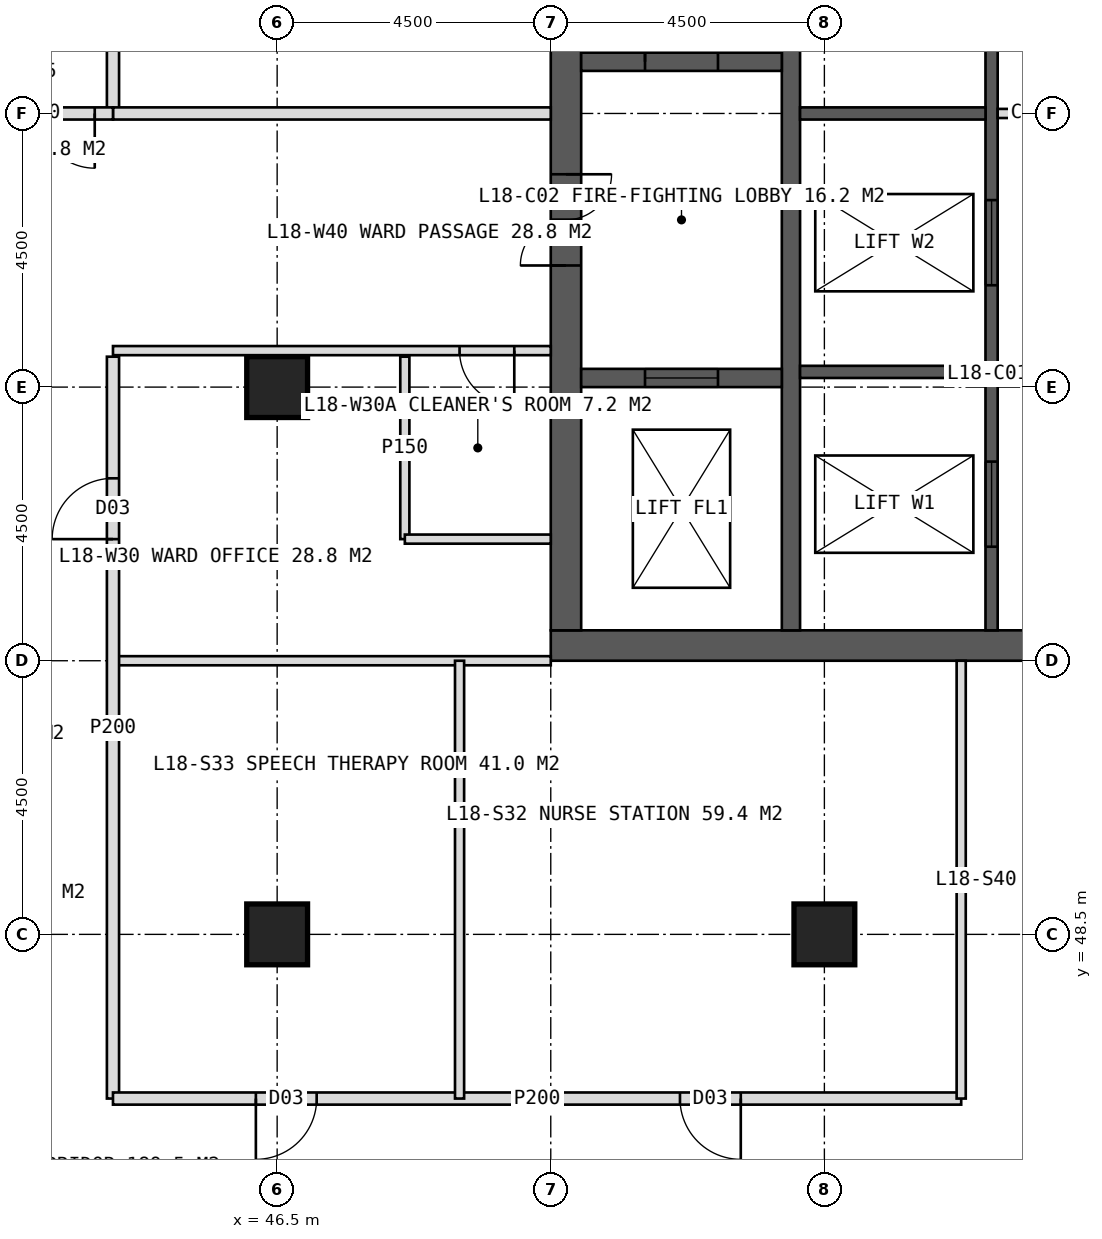
"""IFC4 building model, lengths in metres.
Left out: names, types, materials, properties, quantities, classifications, styles, units other than length and angle.
Written with IfcOpenShell. Run it as: python <this file> out.ifc"""

import sys

from ifc_helpers import new_model, si_unit, direction, frame, frame_2d, origin, origin_2d, place, context, subcontext, project, spatial, rectangle, hollow_rectangle, extrude, element, fill, save


model = new_model("IFC4")
c1 = context("Model", 3, precision=1e-05, world=origin(), true_north=direction((0.0, 1.0)))
c2 = subcontext(c1, "Body", "Model", "MODEL_VIEW")
j1 = project(units=[si_unit("LENGTHUNIT", "METRE"), si_unit("PLANEANGLEUNIT", "RADIAN")], contexts=[c1])
p1 = place(None, origin())
s1 = spatial("IfcSite", under=j1, at=p1, CompositionType="ELEMENT")
p2 = place(p1, origin())
s2 = spatial("IfcBuilding", under=s1, at=p2, CompositionType="ELEMENT")
p3 = place(p2, frame((0.0, 0.0, 79.0)))
s3 = spatial("IfcBuildingStorey", under=s2, at=p3, CompositionType="ELEMENT", Elevation=79.0)
p4 = place(p3, frame((51.0, 53.25, 0.0), z_axis=(0.0, 0.0, 1.0), x_axis=(1.0, 0.0, 0.0)))
e1 = element("IfcWall", 1, at=p4, inside=s3, PredefinedType="SHEAR", context=c2, shape_type="SweptSolid", body=[
    extrude(rectangle(XDim=18.0, YDim=0.5, at=frame_2d((9.0, 0.0))), origin(), (0.0, 0.0, 1.0), 4.0),
])
p5 = place(p4, frame((8.1, 0.0, 0.0)))
e2 = element("IfcOpeningElement", 2, at=p5, cuts=e1, PredefinedType="OPENING", context=c2, shape_type="SweptSolid", body=[
    extrude(rectangle(XDim=1.8, YDim=2.2, at=frame_2d((0.9, 1.1))), frame((0.0, 0.26, 0.0), z_axis=(0.0, -1.0, 0.0), x_axis=(1.0, 0.0, 0.0)), (0.0, 0.0, 1.0), 0.52),
])
p6 = place(p3, frame((51.25, 53.5, 0.0), z_axis=(0.0, 0.0, 1.0), x_axis=(0.0, 1.0, 0.0)))
e3 = element("IfcWall", 3, at=p6, inside=s3, PredefinedType="SHEAR", context=c2, shape_type="SweptSolid", body=[
    extrude(rectangle(XDim=17.0, YDim=0.5, at=frame_2d((8.5, 0.0))), origin(), (0.0, 0.0, 1.0), 4.0),
])
p7 = place(p6, frame((6.0, 0.0, 0.0)))
e4 = element("IfcOpeningElement", 4, at=p7, cuts=e3, PredefinedType="OPENING", context=c2, shape_type="SweptSolid", body=[
    extrude(rectangle(XDim=1.5, YDim=2.2, at=frame_2d((0.75, 1.1))), frame((0.0, 0.26, 0.0), z_axis=(0.0, -1.0, 0.0), x_axis=(1.0, 0.0, 0.0)), (0.0, 0.0, 1.0), 0.52),
])
p8 = place(p3, frame((54.95, 53.5, 0.0), z_axis=(0.0, 0.0, 1.0), x_axis=(0.0, 1.0, 0.0)))
e5 = element("IfcWall", 5, at=p8, inside=s3, PredefinedType="SHEAR", context=c2, shape_type="SweptSolid", body=[
    extrude(rectangle(XDim=17.0, YDim=0.3, at=frame_2d((8.5, 0.0))), origin(), (0.0, 0.0, 1.0), 4.0),
])
p9 = place(p3, frame((58.25, 53.5, 0.0), z_axis=(0.0, 0.0, 1.0), x_axis=(0.0, 1.0, 0.0)))
e6 = element("IfcWall", 6, at=p9, inside=s3, PredefinedType="SHEAR", context=c2, shape_type="SweptSolid", body=[
    extrude(rectangle(XDim=17.0, YDim=0.2, at=frame_2d((8.5, 0.0))), origin(), (0.0, 0.0, 1.0), 4.0),
])
p10 = place(p9, frame((1.375, 0.0, 0.0)))
e7 = element("IfcOpeningElement", 7, at=p10, cuts=e6, PredefinedType="OPENING", context=c2, shape_type="SweptSolid", body=[
    extrude(rectangle(XDim=1.4, YDim=2.2, at=frame_2d((0.7, 1.1))), frame((0.0, 0.11, 0.0), z_axis=(0.0, -1.0, 0.0), x_axis=(1.0, 0.0, 0.0)), (0.0, 0.0, 1.0), 0.22),
])
p11 = place(p9, frame((5.675, 0.0, 0.0)))
e8 = element("IfcOpeningElement", 8, at=p11, cuts=e6, PredefinedType="OPENING", context=c2, shape_type="SweptSolid", body=[
    extrude(rectangle(XDim=1.4, YDim=2.2, at=frame_2d((0.7, 1.1))), frame((0.0, 0.11, 0.0), z_axis=(0.0, -1.0, 0.0), x_axis=(1.0, 0.0, 0.0)), (0.0, 0.0, 1.0), 0.22),
])
for number, where, z_axis, x_axis in (
    (9, (55.1, 57.75, 0.0), (0.0, 0.0, 1.0), (1.0, 0.0, 0.0)),
    (10, (55.1, 62.0, 0.0), (0.0, 0.0, 1.0), (1.0, 0.0, 0.0)),
):
    element("IfcWall", number, at=place(p3, frame(where, z_axis=z_axis, x_axis=x_axis)), inside=s3, PredefinedType="SHEAR", context=c2, shape_type="SweptSolid", body=[
        extrude(rectangle(XDim=3.05, YDim=0.2, at=frame_2d((1.525, 0.0))), origin(), (0.0, 0.0, 1.0), 4.0),
    ])
p12 = place(p3, frame((51.5, 62.85, 0.0), z_axis=(0.0, 0.0, 1.0), x_axis=(1.0, 0.0, 0.0)))
e11 = element("IfcWall", 11, at=p12, inside=s3, PredefinedType="SHEAR", context=c2, shape_type="SweptSolid", body=[
    extrude(rectangle(XDim=3.3, YDim=0.3, at=frame_2d((1.65, 0.0))), origin(), (0.0, 0.0, 1.0), 4.0),
])
p13 = place(p12, frame((1.05, 0.0, 0.0)))
e12 = element("IfcOpeningElement", 12, at=p13, cuts=e11, PredefinedType="OPENING", context=c2, shape_type="SweptSolid", body=[
    extrude(rectangle(XDim=1.2, YDim=2.1, at=frame_2d((0.6, 1.05))), frame((0.0, 0.16, 0.0), z_axis=(0.0, -1.0, 0.0), x_axis=(1.0, 0.0, 0.0)), (0.0, 0.0, 1.0), 0.32),
])
p14 = place(p3, frame((51.5, 57.65, 0.0), z_axis=(0.0, 0.0, 1.0), x_axis=(1.0, 0.0, 0.0)))
e13 = element("IfcWall", 13, at=p14, inside=s3, PredefinedType="SHEAR", context=c2, shape_type="SweptSolid", body=[
    extrude(rectangle(XDim=3.3, YDim=0.3, at=frame_2d((1.65, 0.0))), origin(), (0.0, 0.0, 1.0), 4.0),
])
p15 = place(p14, frame((1.05, 0.0, 0.0)))
e14 = element("IfcOpeningElement", 14, at=p15, cuts=e13, PredefinedType="OPENING", context=c2, shape_type="SweptSolid", body=[
    extrude(rectangle(XDim=1.2, YDim=2.2, at=frame_2d((0.6, 1.1))), frame((0.0, 0.16, 0.0), z_axis=(0.0, -1.0, 0.0), x_axis=(1.0, 0.0, 0.0)), (0.0, 0.0, 1.0), 0.32),
])
for number, where, z_axis, x_axis in (
    (15, (46.5, 48.5, 0.0), (0.0, 0.0, 1.0), (1.0, 0.0, 0.0)),
    (16, (55.5, 48.5, 0.0), (0.0, 0.0, 1.0), (1.0, 0.0, 0.0)),
    (17, (46.5, 57.5, 0.0), (0.0, 0.0, 1.0), (1.0, 0.0, 0.0)),
):
    element("IfcColumn", number, at=place(p3, frame(where, z_axis=z_axis, x_axis=x_axis)), inside=s3, PredefinedType="COLUMN", context=c2, shape_type="SweptSolid", body=[
        extrude(hollow_rectangle(XDim=1.0, YDim=1.0, WallThickness=0.1, at=origin_2d()), origin(), (0.0, 0.0, 1.0), 4.0),
    ])
p16 = place(p3, frame((51.0, 53.0, 0.0), z_axis=(0.0, 0.0, 1.0), x_axis=(-1.0, 0.0, 0.0)))
e18 = element("IfcWall", 18, at=p16, inside=s3, PredefinedType="PARTITIONING", context=c2, shape_type="SweptSolid", body=[
    extrude(rectangle(XDim=7.2, YDim=0.15, at=frame_2d((3.6, 0.0))), origin(), (0.0, 0.0, 1.0), 3.75),
])
p17 = place(p3, frame((43.8, 45.8, 0.0), z_axis=(0.0, 0.0, 1.0), x_axis=(0.0, 1.0, 0.0)))
e19 = element("IfcWall", 19, at=p17, inside=s3, PredefinedType="PARTITIONING", context=c2, shape_type="SweptSolid", body=[
    extrude(rectangle(XDim=12.2, YDim=0.2, at=frame_2d((6.1, 0.0))), origin(), (0.0, 0.0, 1.0), 3.75),
])
p18 = place(p17, frame((9.2, 0.0, 0.0)))
e20 = element("IfcOpeningElement", 20, at=p18, cuts=e19, PredefinedType="OPENING", context=c2, shape_type="SweptSolid", body=[
    extrude(rectangle(XDim=1.0, YDim=2.1, at=frame_2d((0.5, 1.05))), frame((0.0, 0.11, 0.0), z_axis=(0.0, -1.0, 0.0), x_axis=(1.0, 0.0, 0.0)), (0.0, 0.0, 1.0), 0.22),
])
p19 = place(p3, frame((43.8, 62.0, 0.0), z_axis=(0.0, 0.0, 1.0), x_axis=(0.0, 1.0, 0.0)))
e21 = element("IfcWall", 21, at=p19, inside=s3, PredefinedType="PARTITIONING", context=c2, shape_type="SweptSolid", body=[
    extrude(rectangle(XDim=16.2, YDim=0.2, at=frame_2d((8.1, 0.0))), origin(), (0.0, 0.0, 1.0), 3.75),
])
p20 = place(p19, frame((3.25, 0.0, 0.0)))
e22 = element("IfcOpeningElement", 22, at=p20, cuts=e21, PredefinedType="OPENING", context=c2, shape_type="SweptSolid", body=[
    extrude(rectangle(XDim=1.0, YDim=2.1, at=frame_2d((0.5, 1.05))), frame((0.0, 0.11, 0.0), z_axis=(0.0, -1.0, 0.0), x_axis=(1.0, 0.0, 0.0)), (0.0, 0.0, 1.0), 0.22),
])
p21 = place(p19, frame((9.25, 0.0, 0.0)))
e23 = element("IfcOpeningElement", 23, at=p21, cuts=e21, PredefinedType="OPENING", context=c2, shape_type="SweptSolid", body=[
    extrude(rectangle(XDim=1.0, YDim=2.1, at=frame_2d((0.5, 1.05))), frame((0.0, 0.11, 0.0), z_axis=(0.0, -1.0, 0.0), x_axis=(1.0, 0.0, 0.0)), (0.0, 0.0, 1.0), 0.22),
])
p22 = place(p19, frame((13.6, 0.0, 0.0)))
e24 = element("IfcOpeningElement", 24, at=p22, cuts=e21, PredefinedType="OPENING", context=c2, shape_type="SweptSolid", body=[
    extrude(rectangle(XDim=1.0, YDim=2.1, at=frame_2d((0.5, 1.05))), frame((0.0, 0.11, 0.0), z_axis=(0.0, -1.0, 0.0), x_axis=(1.0, 0.0, 0.0)), (0.0, 0.0, 1.0), 0.22),
])
p23 = place(p3, frame((51.0, 58.1, 0.0), z_axis=(0.0, 0.0, 1.0), x_axis=(-1.0, 0.0, 0.0)))
e25 = element("IfcWall", 25, at=p23, inside=s3, PredefinedType="PARTITIONING", context=c2, shape_type="SweptSolid", body=[
    extrude(rectangle(XDim=7.2, YDim=0.15, at=frame_2d((3.6, 0.0))), origin(), (0.0, 0.0, 1.0), 3.75),
])
p24 = place(p23, frame((0.6, 0.0, 0.0)))
e26 = element("IfcOpeningElement", 26, at=p24, cuts=e25, PredefinedType="OPENING", context=c2, shape_type="SweptSolid", body=[
    extrude(rectangle(XDim=0.9, YDim=2.1, at=frame_2d((0.45, 1.05))), frame((0.0, 0.085, 0.0), z_axis=(0.0, -1.0, 0.0), x_axis=(1.0, 0.0, 0.0)), (0.0, 0.0, 1.0), 0.17),
])
p25 = place(p3, frame((51.0, 62.0, 0.0), z_axis=(0.0, 0.0, 1.0), x_axis=(-1.0, 0.0, 0.0)))
e27 = element("IfcWall", 27, at=p25, inside=s3, PredefinedType="SOLIDWALL", context=c2, shape_type="SweptSolid", body=[
    extrude(rectangle(XDim=7.2, YDim=0.2, at=frame_2d((3.6, 0.0))), origin(), (0.0, 0.0, 1.0), 2.75),
])
p26 = place(p3, frame((48.6, 55.0, 0.0), z_axis=(0.0, 0.0, 1.0), x_axis=(0.0, 1.0, 0.0)))
e28 = element("IfcWall", 28, at=p26, inside=s3, PredefinedType="PARTITIONING", context=c2, shape_type="SweptSolid", body=[
    extrude(rectangle(XDim=3.0, YDim=0.15, at=frame_2d((1.5, 0.0))), origin(), (0.0, 0.0, 1.0), 3.75),
])
p27 = place(p3, frame((51.0, 55.0, 0.0), z_axis=(0.0, 0.0, 1.0), x_axis=(-1.0, 0.0, 0.0)))
e29 = element("IfcWall", 29, at=p27, inside=s3, PredefinedType="PARTITIONING", context=c2, shape_type="SweptSolid", body=[
    extrude(rectangle(XDim=2.4, YDim=0.15, at=frame_2d((1.2, 0.0))), origin(), (0.0, 0.0, 1.0), 3.75),
])
p28 = place(p3, frame((57.75, 45.8, 0.0), z_axis=(0.0, 0.0, 1.0), x_axis=(-1.0, 0.0, 0.0)))
e30 = element("IfcWall", 30, at=p28, inside=s3, PredefinedType="PARTITIONING", context=c2, shape_type="SweptSolid", body=[
    extrude(rectangle(XDim=13.95, YDim=0.2, at=frame_2d((6.975, 0.0))), origin(), (0.0, 0.0, 1.0), 3.75),
])
p29 = place(p28, frame((3.625, 0.0, 0.0)))
e31 = element("IfcOpeningElement", 31, at=p29, cuts=e30, PredefinedType="OPENING", context=c2, shape_type="SweptSolid", body=[
    extrude(rectangle(XDim=1.0, YDim=2.1, at=frame_2d((0.5, 1.05))), frame((0.0, 0.11, 0.0), z_axis=(0.0, -1.0, 0.0), x_axis=(1.0, 0.0, 0.0)), (0.0, 0.0, 1.0), 0.22),
])
p30 = place(p28, frame((10.6, 0.0, 0.0)))
e32 = element("IfcOpeningElement", 32, at=p30, cuts=e30, PredefinedType="OPENING", context=c2, shape_type="SweptSolid", body=[
    extrude(rectangle(XDim=1.0, YDim=2.1, at=frame_2d((0.5, 1.05))), frame((0.0, 0.11, 0.0), z_axis=(0.0, -1.0, 0.0), x_axis=(1.0, 0.0, 0.0)), (0.0, 0.0, 1.0), 0.22),
])
for number, where, z_axis, x_axis in (
    (33, (57.75, 53.0, 0.0), (0.0, 0.0, 1.0), (0.0, -1.0, 0.0)),
    (34, (49.5, 53.0, 0.0), (0.0, 0.0, 1.0), (0.0, -1.0, 0.0)),
):
    element("IfcWall", number, at=place(p3, frame(where, z_axis=z_axis, x_axis=x_axis)), inside=s3, PredefinedType="PARTITIONING", context=c2, shape_type="SweptSolid", body=[
        extrude(rectangle(XDim=7.2, YDim=0.15, at=frame_2d((3.6, 0.0))), origin(), (0.0, 0.0, 1.0), 3.75),
    ])
p31 = place(p3, frame((43.8, 62.0, 0.0), z_axis=(0.0, 0.0, 1.0), x_axis=(-1.0, 0.0, 0.0)))
e35 = element("IfcWall", 35, at=p31, inside=s3, PredefinedType="SOLIDWALL", context=c2, shape_type="SweptSolid", body=[
    extrude(rectangle(XDim=2.7, YDim=0.2, at=frame_2d((1.35, 0.0))), origin(), (0.0, 0.0, 1.0), 2.75),
])
p32 = place(p31, frame((0.3, 0.0, 0.0)))
e36 = element("IfcOpeningElement", 36, at=p32, cuts=e35, PredefinedType="OPENING", context=c2, shape_type="SweptSolid", body=[
    extrude(rectangle(XDim=1.8, YDim=2.2, at=frame_2d((0.9, 1.1))), frame((0.0, 0.11, 0.0), z_axis=(0.0, -1.0, 0.0), x_axis=(1.0, 0.0, 0.0)), (0.0, 0.0, 1.0), 0.22),
])
p33 = place(p3, frame((58.35, 62.0, 0.0), z_axis=(0.0, 0.0, 1.0), x_axis=(1.0, 0.0, 0.0)))
e37 = element("IfcWall", 37, at=p33, inside=s3, PredefinedType="PARTITIONING", context=c2, shape_type="SweptSolid", body=[
    extrude(rectangle(XDim=3.3, YDim=0.15, at=frame_2d((1.65, 0.0))), origin(), (0.0, 0.0, 1.0), 3.75),
])
p34 = place(p33, frame((1.15, 0.0, 0.0)))
e38 = element("IfcOpeningElement", 38, at=p34, cuts=e37, PredefinedType="OPENING", context=c2, shape_type="SweptSolid", body=[
    extrude(rectangle(XDim=1.0, YDim=2.1, at=frame_2d((0.5, 1.05))), frame((0.0, 0.085, 0.0), z_axis=(0.0, -1.0, 0.0), x_axis=(1.0, 0.0, 0.0)), (0.0, 0.0, 1.0), 0.17),
])
p35 = place(p24, origin())
e39 = element("IfcDoor", 39, at=p35, inside=s3, OperationType="SINGLE_SWING_LEFT", PredefinedType="DOOR", context=c2, shape_type="SweptSolid", body=[
    extrude(rectangle(XDim=0.9, YDim=2.1, at=frame_2d((0.45, 1.05))), frame((0.0, 0.025, 0.0), z_axis=(0.0, -1.0, 0.0), x_axis=(1.0, 0.0, 0.0)), (0.0, 0.0, 1.0), 0.05),
])
fill(e26, e39)
p36 = place(p18, origin())
e40 = element("IfcDoor", 40, at=p36, inside=s3, OperationType="SINGLE_SWING_LEFT", PredefinedType="DOOR", context=c2, shape_type="SweptSolid", body=[
    extrude(rectangle(XDim=1.0, YDim=2.1, at=frame_2d((0.5, 1.05))), frame((0.0, 0.025, 0.0), z_axis=(0.0, -1.0, 0.0), x_axis=(1.0, 0.0, 0.0)), (0.0, 0.0, 1.0), 0.05),
])
fill(e20, e40)
p37 = place(p29, origin())
e41 = element("IfcDoor", 41, at=p37, inside=s3, OperationType="SINGLE_SWING_LEFT", PredefinedType="DOOR", context=c2, shape_type="SweptSolid", body=[
    extrude(rectangle(XDim=1.0, YDim=2.1, at=frame_2d((0.5, 1.05))), frame((0.0, 0.025, 0.0), z_axis=(0.0, -1.0, 0.0), x_axis=(1.0, 0.0, 0.0)), (0.0, 0.0, 1.0), 0.05),
])
fill(e31, e41)
p38 = place(p30, origin())
e42 = element("IfcDoor", 42, at=p38, inside=s3, OperationType="SINGLE_SWING_RIGHT", PredefinedType="DOOR", context=c2, shape_type="SweptSolid", body=[
    extrude(rectangle(XDim=1.0, YDim=2.1, at=frame_2d((0.5, 1.05))), frame((0.0, 0.025, 0.0), z_axis=(0.0, -1.0, 0.0), x_axis=(1.0, 0.0, 0.0)), (0.0, 0.0, 1.0), 0.05),
])
fill(e32, e42)
p39 = place(p32, origin())
e43 = element("IfcDoor", 43, at=p39, inside=s3, OperationType="DOUBLE_DOOR_DOUBLE_SWING", PredefinedType="DOOR", context=c2, shape_type="SweptSolid", body=[
    extrude(rectangle(XDim=1.8, YDim=2.2, at=frame_2d((0.9, 1.1))), frame((0.0, 0.025, 0.0), z_axis=(0.0, -1.0, 0.0), x_axis=(1.0, 0.0, 0.0)), (0.0, 0.0, 1.0), 0.05),
])
fill(e36, e43)
p40 = place(p7, origin())
e44 = element("IfcDoor", 44, at=p40, inside=s3, OperationType="DOUBLE_DOOR_SINGLE_SWING", PredefinedType="DOOR", context=c2, shape_type="SweptSolid", body=[
    extrude(rectangle(XDim=1.5, YDim=2.2, at=frame_2d((0.75, 1.1))), frame((0.0, 0.025, 0.0), z_axis=(0.0, -1.0, 0.0), x_axis=(1.0, 0.0, 0.0)), (0.0, 0.0, 1.0), 0.05),
])
fill(e4, e44)
p41 = place(p13, origin())
e45 = element("IfcDoor", 45, at=p41, inside=s3, OperationType="SINGLE_SWING_LEFT", PredefinedType="DOOR", context=c2, shape_type="SweptSolid", body=[
    extrude(rectangle(XDim=1.2, YDim=2.1, at=frame_2d((0.6, 1.05))), frame((0.0, 0.025, 0.0), z_axis=(0.0, -1.0, 0.0), x_axis=(1.0, 0.0, 0.0)), (0.0, 0.0, 1.0), 0.05),
])
fill(e12, e45)
p42 = place(p15, origin())
e46 = element("IfcDoor", 46, at=p42, inside=s3, OperationType="SLIDING_TO_LEFT", PredefinedType="DOOR", context=c2, shape_type="SweptSolid", body=[
    extrude(rectangle(XDim=1.2, YDim=2.2, at=frame_2d((0.6, 1.1))), frame((0.0, 0.025, 0.0), z_axis=(0.0, -1.0, 0.0), x_axis=(1.0, 0.0, 0.0)), (0.0, 0.0, 1.0), 0.05),
])
fill(e14, e46)
p43 = place(p10, origin())
e47 = element("IfcDoor", 47, at=p43, inside=s3, OperationType="SLIDING_TO_LEFT", PredefinedType="DOOR", context=c2, shape_type="SweptSolid", body=[
    extrude(rectangle(XDim=1.4, YDim=2.2, at=frame_2d((0.7, 1.1))), frame((0.0, 0.025, 0.0), z_axis=(0.0, -1.0, 0.0), x_axis=(1.0, 0.0, 0.0)), (0.0, 0.0, 1.0), 0.05),
])
fill(e7, e47)
p44 = place(p11, origin())
e48 = element("IfcDoor", 48, at=p44, inside=s3, OperationType="SLIDING_TO_LEFT", PredefinedType="DOOR", context=c2, shape_type="SweptSolid", body=[
    extrude(rectangle(XDim=1.4, YDim=2.2, at=frame_2d((0.7, 1.1))), frame((0.0, 0.025, 0.0), z_axis=(0.0, -1.0, 0.0), x_axis=(1.0, 0.0, 0.0)), (0.0, 0.0, 1.0), 0.05),
])
fill(e8, e48)
save(model, sys.argv[1])
